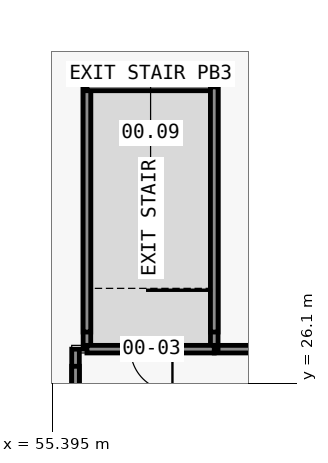
"""IFC4 building model, lengths in metres.
Left out: names, types, materials, properties, quantities, classifications, styles, units other than length and angle.
Written with IfcOpenShell. Run it as: python <this file> out.ifc"""

import sys

from ifc_helpers import new_model, si_unit, direction, frame, frame_2d, origin, place, context, subcontext, project, spatial, rectangle, extrude, element, fill, save


model = new_model("IFC4")
c1 = context("Model", 3, precision=1e-05, world=origin(), true_north=direction((0.0, 1.0)))
c2 = subcontext(c1, "Body", "Model", "MODEL_VIEW")
j1 = project(units=[si_unit("LENGTHUNIT", "METRE"), si_unit("PLANEANGLEUNIT", "RADIAN")], contexts=[c1])
p1 = place(None, origin())
s1 = spatial("IfcSite", under=j1, at=p1, CompositionType="ELEMENT")
p2 = place(p1, origin())
s2 = spatial("IfcBuilding", under=s1, at=p2, CompositionType="ELEMENT")
p3 = place(p2, origin())
s3 = spatial("IfcBuildingStorey", under=s2, at=p3, CompositionType="ELEMENT", Elevation=0.0)
p4 = place(p3, frame((59.65, 27.0, 0.0), z_axis=(0.0, 0.0, 1.0), x_axis=(1.0, 0.0, 0.0)))
e1 = element("IfcWall", 1, at=p4, inside=s3, PredefinedType="PARTITIONING", context=c2, shape_type="SweptSolid", body=[
    extrude(rectangle(XDim=2.65, YDim=0.2, at=frame_2d((1.325, 0.0))), origin(), (0.0, 0.0, 1.0), 6.95),
])
p5 = place(p3, frame((56.3, 27.0, 0.0), z_axis=(0.0, 0.0, 1.0), x_axis=(0.0, 1.0, 0.0)))
e2 = element("IfcWall", 2, at=p5, inside=s3, PredefinedType="PARTITIONING", context=c2, shape_type="SweptSolid", body=[
    extrude(rectangle(XDim=6.9, YDim=0.2, at=frame_2d((3.45, 0.0))), origin(), (0.0, 0.0, 1.0), 6.95),
])
p6 = place(p3, frame((56.3, 33.9, 0.0), z_axis=(0.0, 0.0, 1.0), x_axis=(1.0, 0.0, 0.0)))
e3 = element("IfcWall", 3, at=p6, inside=s3, PredefinedType="PARTITIONING", context=c2, shape_type="SweptSolid", body=[
    extrude(rectangle(XDim=3.35, YDim=0.2, at=frame_2d((1.675, 0.0))), origin(), (0.0, 0.0, 1.0), 7.65),
])
p7 = place(p3, frame((59.65, 33.9, 0.0), z_axis=(0.0, 0.0, 1.0), x_axis=(0.0, -1.0, 0.0)))
e4 = element("IfcWall", 4, at=p7, inside=s3, PredefinedType="PARTITIONING", context=c2, shape_type="SweptSolid", body=[
    extrude(rectangle(XDim=6.9, YDim=0.2, at=frame_2d((3.45, 0.0))), origin(), (0.0, 0.0, 1.0), 6.95),
])
p8 = place(p3, frame((59.65, 27.0, 0.0), z_axis=(0.0, 0.0, 1.0), x_axis=(-1.0, 0.0, 0.0)))
e5 = element("IfcWall", 5, at=p8, inside=s3, PredefinedType="PARTITIONING", context=c2, shape_type="SweptSolid", body=[
    extrude(rectangle(XDim=3.35, YDim=0.2, at=frame_2d((1.675, 0.0))), origin(), (0.0, 0.0, 1.0), 6.95),
])
p9 = place(p8, frame((1.1, 0.0, 0.0)))
e6 = element("IfcOpeningElement", 6, at=p9, cuts=e5, PredefinedType="OPENING", context=c2, shape_type="SweptSolid", body=[
    extrude(rectangle(XDim=1.1, YDim=2.1, at=frame_2d((0.55, 1.05))), frame((0.0, 0.11, 0.0), z_axis=(0.0, -1.0, 0.0), x_axis=(1.0, 0.0, 0.0)), (0.0, 0.0, 1.0), 0.22),
])
p10 = place(p3, frame((56.0, 24.4, 0.0), z_axis=(0.0, 0.0, 1.0), x_axis=(0.0, 1.0, 0.0)))
e7 = element("IfcWall", 7, at=p10, inside=s3, PredefinedType="PARTITIONING", context=c2, shape_type="SweptSolid", body=[
    extrude(rectangle(XDim=2.6, YDim=0.2, at=frame_2d((1.3, 0.0))), origin(), (0.0, 0.0, 1.0), 6.95),
])
for number, where, z_axis, x_axis in (
    (8, (56.3, 27.45, 6.95), (0.0, 0.0, 1.0), (0.0, 1.0, 0.0)),
    (9, (59.65, 33.9, 6.95), (0.0, 0.0, 1.0), (0.0, -1.0, 0.0)),
):
    element("IfcWall", number, at=place(p3, frame(where, z_axis=z_axis, x_axis=x_axis)), inside=s3, PredefinedType="PARTITIONING", context=c2, shape_type="SweptSolid", body=[
        extrude(rectangle(XDim=6.45, YDim=0.2, at=frame_2d((3.225, 0.0))), origin(), (0.0, 0.0, 1.0), 0.7),
    ])
p11 = place(p3, frame((56.0, 24.4, 6.95), z_axis=(0.0, 0.0, 1.0), x_axis=(0.0, 1.0, 0.0)))
e10 = element("IfcWall", 10, at=p11, inside=s3, PredefinedType="PARTITIONING", context=c2, shape_type="SweptSolid", body=[
    extrude(rectangle(XDim=2.15, YDim=0.2, at=frame_2d((1.075, 0.0))), origin(), (0.0, 0.0, 1.0), 0.7),
])
p12 = place(p9, origin())
e11 = element("IfcDoor", 11, at=p12, inside=s3, OperationType="SINGLE_SWING_LEFT", PredefinedType="DOOR", context=c2, shape_type="SweptSolid", body=[
    extrude(rectangle(XDim=1.1, YDim=2.1, at=frame_2d((0.55, 1.05))), frame((0.0, 0.025, 0.0), z_axis=(0.0, -1.0, 0.0), x_axis=(1.0, 0.0, 0.0)), (0.0, 0.0, 1.0), 0.05),
])
fill(e6, e11)
save(model, sys.argv[1])
